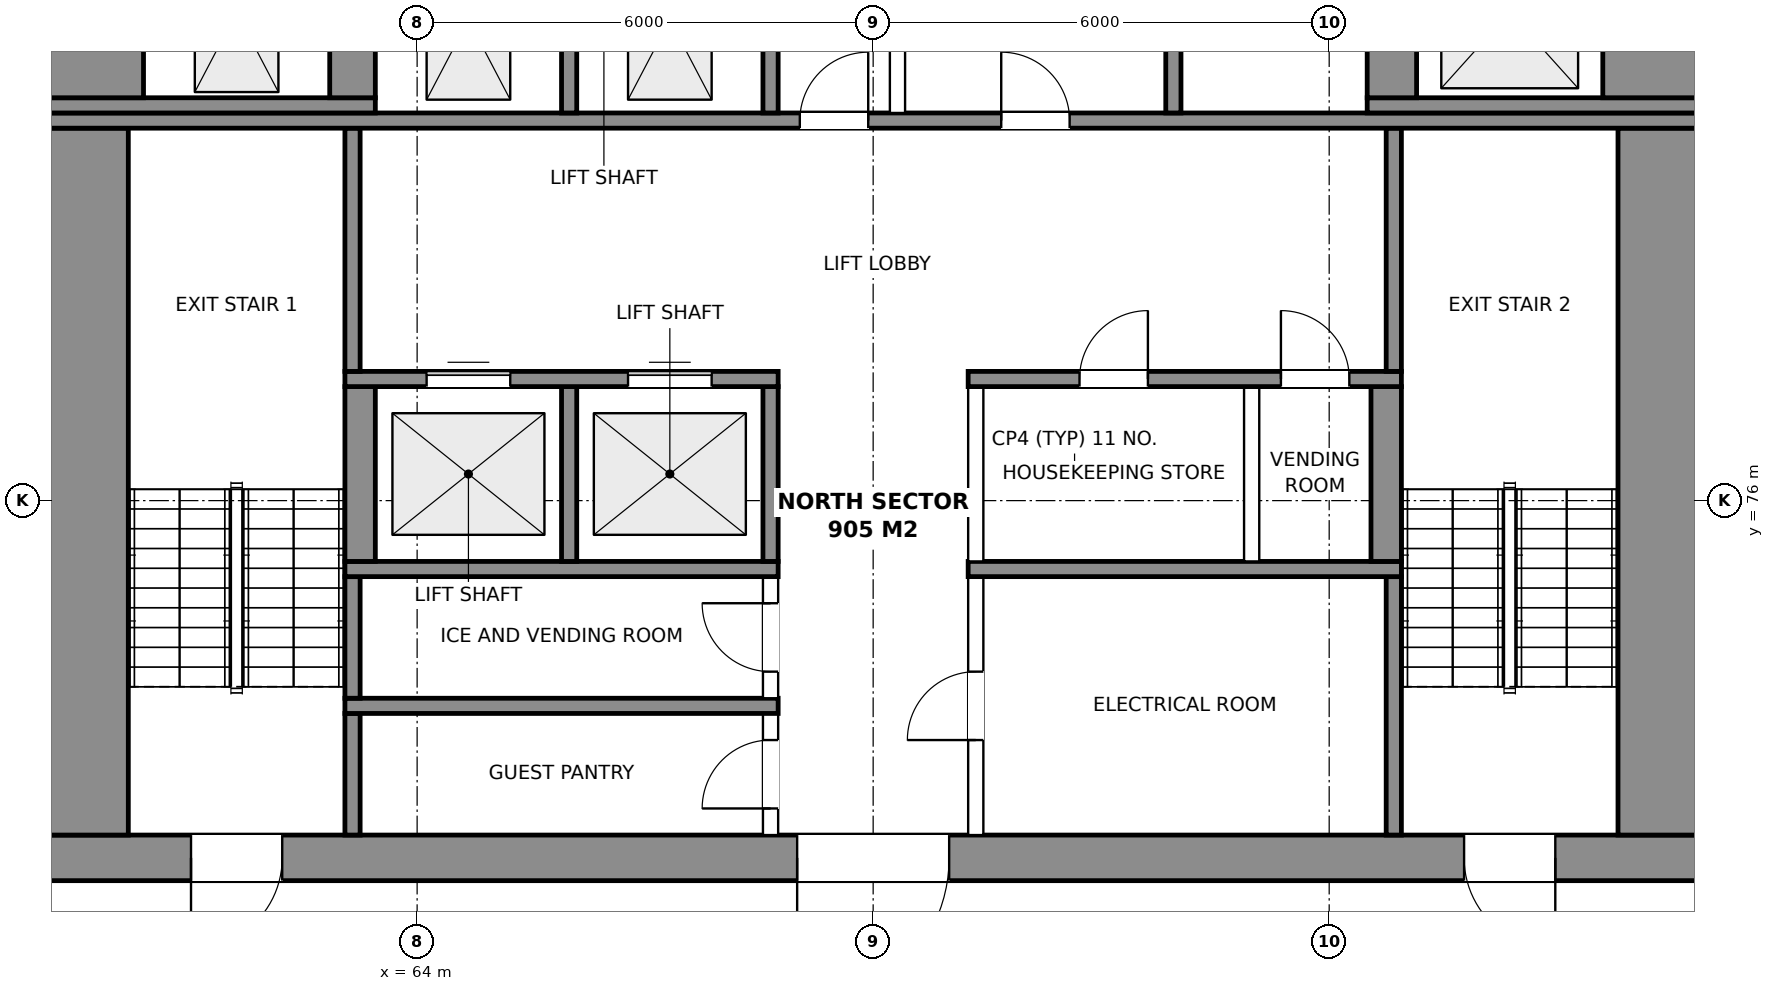
"""IFC4 building model, lengths in metres.
Left out: names, types, materials, properties, quantities, classifications, styles, units other than length and angle.
Written with IfcOpenShell. Run it as: python <this file> out.ifc"""

import sys

from ifc_helpers import new_model, si_unit, direction, frame, frame_2d, origin, place, context, subcontext, project, spatial, rectangle, extrude, element, fill, save


model = new_model("IFC4")
c1 = context("Model", 3, precision=1e-05, world=origin(), true_north=direction((0.0, 1.0)))
c2 = subcontext(c1, "Body", "Model", "MODEL_VIEW")
j1 = project(units=[si_unit("LENGTHUNIT", "METRE"), si_unit("PLANEANGLEUNIT", "RADIAN")], contexts=[c1])
p1 = place(None, origin())
s1 = spatial("IfcSite", under=j1, at=p1, CompositionType="ELEMENT")
p2 = place(p1, origin())
s2 = spatial("IfcBuilding", under=s1, at=p2, CompositionType="ELEMENT")
p3 = place(p2, frame((0.0, 0.0, 317.8)))
s3 = spatial("IfcBuildingStorey", under=s2, at=p3, CompositionType="ELEMENT", Elevation=317.8)
p4 = place(p3, frame((59.0, 71.3, 0.0), z_axis=(0.0, 0.0, 1.0), x_axis=(1.0, 0.0, 0.0)))
e1 = element("IfcWall", 1, at=p4, inside=s3, PredefinedType="SHEAR", context=c2, shape_type="SweptSolid", body=[
    extrude(rectangle(XDim=22.0, YDim=0.6, at=frame_2d((11.0, 0.0))), origin(), (0.0, 0.0, 1.0), 3.9),
])
p5 = place(p4, frame((2.025, 0.0, 0.0)))
e2 = element("IfcOpeningElement", 2, at=p5, cuts=e1, PredefinedType="OPENING", context=c2, shape_type="SweptSolid", body=[
    extrude(rectangle(XDim=1.2, YDim=2.1, at=frame_2d((0.6, 1.05))), frame((0.0, 0.31, 0.0), z_axis=(0.0, -1.0, 0.0), x_axis=(1.0, 0.0, 0.0)), (0.0, 0.0, 1.0), 0.62),
])
p6 = place(p4, frame((18.775, 0.0, 0.0)))
e3 = element("IfcOpeningElement", 3, at=p6, cuts=e1, PredefinedType="OPENING", context=c2, shape_type="SweptSolid", body=[
    extrude(rectangle(XDim=1.2, YDim=2.1, at=frame_2d((0.6, 1.05))), frame((0.0, 0.31, 0.0), z_axis=(0.0, -1.0, 0.0), x_axis=(1.0, 0.0, 0.0)), (0.0, 0.0, 1.0), 0.62),
])
p7 = place(p4, frame((10.0, 0.0, 0.0)))
e4 = element("IfcOpeningElement", 4, at=p7, cuts=e1, PredefinedType="OPENING", context=c2, shape_type="SweptSolid", body=[
    extrude(rectangle(XDim=2.0, YDim=2.1, at=frame_2d((1.0, 1.05))), frame((0.0, 0.31, 0.0), z_axis=(0.0, -1.0, 0.0), x_axis=(1.0, 0.0, 0.0)), (0.0, 0.0, 1.0), 0.62),
])
p8 = place(p3, frame((59.6, 71.6, 0.0), z_axis=(0.0, 0.0, 1.0), x_axis=(0.0, 1.0, 0.0)))
e5 = element("IfcWall", 5, at=p8, inside=s3, PredefinedType="SHEAR", context=c2, shape_type="SweptSolid", body=[
    extrude(rectangle(XDim=9.3, YDim=1.2, at=frame_2d((4.65, 0.0))), origin(), (0.0, 0.0, 1.0), 3.9),
])
p9 = place(p3, frame((63.15, 71.6, 0.0), z_axis=(0.0, 0.0, 1.0), x_axis=(0.0, 1.0, 0.0)))
e6 = element("IfcWall", 6, at=p9, inside=s3, PredefinedType="SHEAR", context=c2, shape_type="SweptSolid", body=[
    extrude(rectangle(XDim=1.6, YDim=0.2, at=frame_2d((0.8, 0.0))), origin(), (0.0, 0.0, 1.0), 3.9),
])
p10 = place(p3, frame((68.65, 71.6, 0.0), z_axis=(0.0, 0.0, 1.0), x_axis=(0.0, 1.0, 0.0)))
e7 = element("IfcWall", 7, at=p10, inside=s3, PredefinedType="PARTITIONING", context=c2, shape_type="SweptSolid", body=[
    extrude(rectangle(XDim=1.6, YDim=0.2, at=frame_2d((0.8, 0.0))), origin(), (0.0, 0.0, 1.0), 3.5),
])
p11 = place(p10, frame((0.35, 0.0, 0.0)))
e8 = element("IfcOpeningElement", 8, at=p11, cuts=e7, PredefinedType="OPENING", context=c2, shape_type="SweptSolid", body=[
    extrude(rectangle(XDim=0.9, YDim=2.1, at=frame_2d((0.45, 1.05))), frame((0.0, 0.11, 0.0), z_axis=(0.0, -1.0, 0.0), x_axis=(1.0, 0.0, 0.0)), (0.0, 0.0, 1.0), 0.22),
])
p12 = place(p3, frame((71.35, 71.6, 0.0), z_axis=(0.0, 0.0, 1.0), x_axis=(0.0, 1.0, 0.0)))
e9 = element("IfcWall", 9, at=p12, inside=s3, PredefinedType="PARTITIONING", context=c2, shape_type="SweptSolid", body=[
    extrude(rectangle(XDim=3.4, YDim=0.2, at=frame_2d((1.7, 0.0))), origin(), (0.0, 0.0, 1.0), 3.5),
])
p13 = place(p12, frame((1.25, 0.0, 0.0)))
e10 = element("IfcOpeningElement", 10, at=p13, cuts=e9, PredefinedType="OPENING", context=c2, shape_type="SweptSolid", body=[
    extrude(rectangle(XDim=0.9, YDim=2.1, at=frame_2d((0.45, 1.05))), frame((0.0, 0.11, 0.0), z_axis=(0.0, -1.0, 0.0), x_axis=(1.0, 0.0, 0.0)), (0.0, 0.0, 1.0), 0.22),
])
p14 = place(p3, frame((76.85, 71.6, 0.0), z_axis=(0.0, 0.0, 1.0), x_axis=(0.0, 1.0, 0.0)))
e11 = element("IfcWall", 11, at=p14, inside=s3, PredefinedType="SHEAR", context=c2, shape_type="SweptSolid", body=[
    extrude(rectangle(XDim=3.4, YDim=0.2, at=frame_2d((1.7, 0.0))), origin(), (0.0, 0.0, 1.0), 3.9),
])
p15 = place(p3, frame((80.4, 71.6, 0.0), z_axis=(0.0, 0.0, 1.0), x_axis=(0.0, 1.0, 0.0)))
e12 = element("IfcWall", 12, at=p15, inside=s3, PredefinedType="SHEAR", context=c2, shape_type="SweptSolid", body=[
    extrude(rectangle(XDim=9.3, YDim=1.2, at=frame_2d((4.65, 0.0))), origin(), (0.0, 0.0, 1.0), 3.9),
])
p16 = place(p3, frame((63.05, 73.3, 0.0), z_axis=(0.0, 0.0, 1.0), x_axis=(1.0, 0.0, 0.0)))
e13 = element("IfcWall", 13, at=p16, inside=s3, PredefinedType="SHEAR", context=c2, shape_type="SweptSolid", body=[
    extrude(rectangle(XDim=5.7, YDim=0.2, at=frame_2d((2.85, 0.0))), origin(), (0.0, 0.0, 1.0), 3.9),
])
p17 = place(p3, frame((63.15, 73.4, 0.0), z_axis=(0.0, 0.0, 1.0), x_axis=(0.0, 1.0, 0.0)))
e14 = element("IfcWall", 14, at=p17, inside=s3, PredefinedType="SHEAR", context=c2, shape_type="SweptSolid", body=[
    extrude(rectangle(XDim=1.6, YDim=0.2, at=frame_2d((0.8, 0.0))), origin(), (0.0, 0.0, 1.0), 3.9),
])
p18 = place(p3, frame((68.65, 73.4, 0.0), z_axis=(0.0, 0.0, 1.0), x_axis=(0.0, 1.0, 0.0)))
e15 = element("IfcWall", 15, at=p18, inside=s3, PredefinedType="PARTITIONING", context=c2, shape_type="SweptSolid", body=[
    extrude(rectangle(XDim=1.6, YDim=0.2, at=frame_2d((0.8, 0.0))), origin(), (0.0, 0.0, 1.0), 3.5),
])
p19 = place(p18, frame((0.35, 0.0, 0.0)))
e16 = element("IfcOpeningElement", 16, at=p19, cuts=e15, PredefinedType="OPENING", context=c2, shape_type="SweptSolid", body=[
    extrude(rectangle(XDim=0.9, YDim=2.1, at=frame_2d((0.45, 1.05))), frame((0.0, 0.11, 0.0), z_axis=(0.0, -1.0, 0.0), x_axis=(1.0, 0.0, 0.0)), (0.0, 0.0, 1.0), 0.22),
])
for number, where, z_axis, x_axis in (
    (17, (63.05, 75.1, 0.0), (0.0, 0.0, 1.0), (1.0, 0.0, 0.0)),
    (18, (71.25, 75.1, 0.0), (0.0, 0.0, 1.0), (1.0, 0.0, 0.0)),
):
    element("IfcWall", number, at=place(p3, frame(where, z_axis=z_axis, x_axis=x_axis)), inside=s3, PredefinedType="SHEAR", context=c2, shape_type="SweptSolid", body=[
        extrude(rectangle(XDim=5.7, YDim=0.2, at=frame_2d((2.85, 0.0))), origin(), (0.0, 0.0, 1.0), 3.9),
    ])
p20 = place(p3, frame((63.25, 75.2, 0.0), z_axis=(0.0, 0.0, 1.0), x_axis=(0.0, 1.0, 0.0)))
e19 = element("IfcWall", 19, at=p20, inside=s3, PredefinedType="SHEAR", context=c2, shape_type="SweptSolid", body=[
    extrude(rectangle(XDim=2.3, YDim=0.4, at=frame_2d((1.15, 0.0))), origin(), (0.0, 0.0, 1.0), 3.9),
])
for number, where, z_axis, x_axis in (
    (20, (66.0, 75.2, 0.0), (0.0, 0.0, 1.0), (0.0, 1.0, 0.0)),
    (21, (68.65, 75.2, 0.0), (0.0, 0.0, 1.0), (0.0, 1.0, 0.0)),
):
    element("IfcWall", number, at=place(p3, frame(where, z_axis=z_axis, x_axis=x_axis)), inside=s3, PredefinedType="SHEAR", context=c2, shape_type="SweptSolid", body=[
        extrude(rectangle(XDim=2.3, YDim=0.2, at=frame_2d((1.15, 0.0))), origin(), (0.0, 0.0, 1.0), 3.9),
    ])
for number, where, z_axis, x_axis in (
    (22, (71.35, 75.2, 0.0), (0.0, 0.0, 1.0), (0.0, 1.0, 0.0)),
    (23, (74.98, 75.2, 0.0), (0.0, 0.0, 1.0), (0.0, 1.0, 0.0)),
):
    element("IfcWall", number, at=place(p3, frame(where, z_axis=z_axis, x_axis=x_axis)), inside=s3, PredefinedType="PARTITIONING", context=c2, shape_type="SweptSolid", body=[
        extrude(rectangle(XDim=2.3, YDim=0.2, at=frame_2d((1.15, 0.0))), origin(), (0.0, 0.0, 1.0), 3.5),
    ])
p21 = place(p3, frame((76.75, 75.2, 0.0), z_axis=(0.0, 0.0, 1.0), x_axis=(0.0, 1.0, 0.0)))
e24 = element("IfcWall", 24, at=p21, inside=s3, PredefinedType="SHEAR", context=c2, shape_type="SweptSolid", body=[
    extrude(rectangle(XDim=2.3, YDim=0.4, at=frame_2d((1.15, 0.0))), origin(), (0.0, 0.0, 1.0), 3.9),
])
p22 = place(p3, frame((63.05, 77.6, 0.0), z_axis=(0.0, 0.0, 1.0), x_axis=(1.0, 0.0, 0.0)))
e25 = element("IfcWall", 25, at=p22, inside=s3, PredefinedType="SHEAR", context=c2, shape_type="SweptSolid", body=[
    extrude(rectangle(XDim=5.7, YDim=0.2, at=frame_2d((2.85, 0.0))), origin(), (0.0, 0.0, 1.0), 3.9),
])
p23 = place(p22, frame((1.075, 0.0, 0.0)))
e26 = element("IfcOpeningElement", 26, at=p23, cuts=e25, PredefinedType="OPENING", context=c2, shape_type="SweptSolid", body=[
    extrude(rectangle(XDim=1.1, YDim=2.1, at=frame_2d((0.55, 1.05))), frame((0.0, 0.11, 0.0), z_axis=(0.0, -1.0, 0.0), x_axis=(1.0, 0.0, 0.0)), (0.0, 0.0, 1.0), 0.22),
])
p24 = place(p22, frame((3.725, 0.0, 0.0)))
e27 = element("IfcOpeningElement", 27, at=p24, cuts=e25, PredefinedType="OPENING", context=c2, shape_type="SweptSolid", body=[
    extrude(rectangle(XDim=1.1, YDim=2.1, at=frame_2d((0.55, 1.05))), frame((0.0, 0.11, 0.0), z_axis=(0.0, -1.0, 0.0), x_axis=(1.0, 0.0, 0.0)), (0.0, 0.0, 1.0), 0.22),
])
p25 = place(p3, frame((71.25, 77.6, 0.0), z_axis=(0.0, 0.0, 1.0), x_axis=(1.0, 0.0, 0.0)))
e28 = element("IfcWall", 28, at=p25, inside=s3, PredefinedType="SHEAR", context=c2, shape_type="SweptSolid", body=[
    extrude(rectangle(XDim=5.7, YDim=0.2, at=frame_2d((2.85, 0.0))), origin(), (0.0, 0.0, 1.0), 3.9),
])
p26 = place(p25, frame((1.465, 0.0, 0.0)))
e29 = element("IfcOpeningElement", 29, at=p26, cuts=e28, PredefinedType="OPENING", context=c2, shape_type="SweptSolid", body=[
    extrude(rectangle(XDim=0.9, YDim=2.1, at=frame_2d((0.45, 1.05))), frame((0.0, 0.11, 0.0), z_axis=(0.0, -1.0, 0.0), x_axis=(1.0, 0.0, 0.0)), (0.0, 0.0, 1.0), 0.22),
])
p27 = place(p25, frame((4.115, 0.0, 0.0)))
e30 = element("IfcOpeningElement", 30, at=p27, cuts=e28, PredefinedType="OPENING", context=c2, shape_type="SweptSolid", body=[
    extrude(rectangle(XDim=0.9, YDim=2.1, at=frame_2d((0.45, 1.05))), frame((0.0, 0.11, 0.0), z_axis=(0.0, -1.0, 0.0), x_axis=(1.0, 0.0, 0.0)), (0.0, 0.0, 1.0), 0.22),
])
for number, where, z_axis, x_axis in (
    (31, (63.15, 77.7, 0.0), (0.0, 0.0, 1.0), (0.0, 1.0, 0.0)),
    (32, (76.85, 77.7, 0.0), (0.0, 0.0, 1.0), (0.0, 1.0, 0.0)),
):
    element("IfcWall", number, at=place(p3, frame(where, z_axis=z_axis, x_axis=x_axis)), inside=s3, PredefinedType="SHEAR", context=c2, shape_type="SweptSolid", body=[
        extrude(rectangle(XDim=3.2, YDim=0.2, at=frame_2d((1.6, 0.0))), origin(), (0.0, 0.0, 1.0), 3.9),
    ])
p28 = place(p3, frame((59.0, 81.0, 0.0), z_axis=(0.0, 0.0, 1.0), x_axis=(1.0, 0.0, 0.0)))
e33 = element("IfcWall", 33, at=p28, inside=s3, PredefinedType="SHEAR", context=c2, shape_type="SweptSolid", body=[
    extrude(rectangle(XDim=22.0, YDim=0.2, at=frame_2d((11.0, 0.0))), origin(), (0.0, 0.0, 1.0), 3.9),
])
p29 = place(p28, frame((10.035, 0.0, 0.0)))
e34 = element("IfcOpeningElement", 34, at=p29, cuts=e33, PredefinedType="OPENING", context=c2, shape_type="SweptSolid", body=[
    extrude(rectangle(XDim=0.9, YDim=2.1, at=frame_2d((0.45, 1.05))), frame((0.0, 0.11, 0.0), z_axis=(0.0, -1.0, 0.0), x_axis=(1.0, 0.0, 0.0)), (0.0, 0.0, 1.0), 0.22),
])
p30 = place(p28, frame((12.685, 0.0, 0.0)))
e35 = element("IfcOpeningElement", 35, at=p30, cuts=e33, PredefinedType="OPENING", context=c2, shape_type="SweptSolid", body=[
    extrude(rectangle(XDim=0.9, YDim=2.1, at=frame_2d((0.45, 1.05))), frame((0.0, 0.11, 0.0), z_axis=(0.0, -1.0, 0.0), x_axis=(1.0, 0.0, 0.0)), (0.0, 0.0, 1.0), 0.22),
])
p31 = place(p3, frame((59.0, 81.2, 0.0), z_axis=(0.0, 0.0, 1.0), x_axis=(1.0, 0.0, 0.0)))
e36 = element("IfcWall", 36, at=p31, inside=s3, PredefinedType="SHEAR", context=c2, shape_type="SweptSolid", body=[
    extrude(rectangle(XDim=4.45, YDim=0.2, at=frame_2d((2.225, 0.0))), origin(), (0.0, 0.0, 1.0), 3.9),
])
for number, where, z_axis, x_axis in (
    (37, (66.0, 81.1, 0.0), (0.0, 0.0, 1.0), (0.0, 1.0, 0.0)),
    (38, (68.65, 81.1, 0.0), (0.0, 0.0, 1.0), (0.0, 1.0, 0.0)),
):
    element("IfcWall", number, at=place(p3, frame(where, z_axis=z_axis, x_axis=x_axis)), inside=s3, PredefinedType="SHEAR", context=c2, shape_type="SweptSolid", body=[
        extrude(rectangle(XDim=2.45, YDim=0.2, at=frame_2d((1.225, 0.0))), origin(), (0.0, 0.0, 1.0), 3.9),
    ])
p32 = place(p3, frame((70.32, 81.1, 0.0), z_axis=(0.0, 0.0, 1.0), x_axis=(0.0, 1.0, 0.0)))
e39 = element("IfcWall", 39, at=p32, inside=s3, PredefinedType="PARTITIONING", context=c2, shape_type="SweptSolid", body=[
    extrude(rectangle(XDim=2.45, YDim=0.2, at=frame_2d((1.225, 0.0))), origin(), (0.0, 0.0, 1.0), 3.5),
])
p33 = place(p3, frame((73.95, 81.1, 0.0), z_axis=(0.0, 0.0, 1.0), x_axis=(0.0, 1.0, 0.0)))
e40 = element("IfcWall", 40, at=p33, inside=s3, PredefinedType="SHEAR", context=c2, shape_type="SweptSolid", body=[
    extrude(rectangle(XDim=2.45, YDim=0.2, at=frame_2d((1.225, 0.0))), origin(), (0.0, 0.0, 1.0), 3.9),
])
p34 = place(p3, frame((76.5, 81.2, 0.0), z_axis=(0.0, 0.0, 1.0), x_axis=(1.0, 0.0, 0.0)))
e41 = element("IfcWall", 41, at=p34, inside=s3, PredefinedType="SHEAR", context=c2, shape_type="SweptSolid", body=[
    extrude(rectangle(XDim=4.5, YDim=0.2, at=frame_2d((2.25, 0.0))), origin(), (0.0, 0.0, 1.0), 3.9),
])
p35 = place(p3, frame((59.7, 81.3, 0.0), z_axis=(0.0, 0.0, 1.0), x_axis=(0.0, 1.0, 0.0)))
e42 = element("IfcWall", 42, at=p35, inside=s3, PredefinedType="SHEAR", context=c2, shape_type="SweptSolid", body=[
    extrude(rectangle(XDim=2.25, YDim=1.4, at=frame_2d((1.125, 0.0))), origin(), (0.0, 0.0, 1.0), 3.9),
])
p36 = place(p3, frame((63.15, 81.3, 0.0), z_axis=(0.0, 0.0, 1.0), x_axis=(0.0, 1.0, 0.0)))
e43 = element("IfcWall", 43, at=p36, inside=s3, PredefinedType="SHEAR", context=c2, shape_type="SweptSolid", body=[
    extrude(rectangle(XDim=2.25, YDim=0.6, at=frame_2d((1.125, 0.0))), origin(), (0.0, 0.0, 1.0), 3.9),
])
p37 = place(p3, frame((76.825, 81.3, 0.0), z_axis=(0.0, 0.0, 1.0), x_axis=(0.0, 1.0, 0.0)))
e44 = element("IfcWall", 44, at=p37, inside=s3, PredefinedType="SHEAR", context=c2, shape_type="SweptSolid", body=[
    extrude(rectangle(XDim=2.25, YDim=0.65, at=frame_2d((1.125, 0.0))), origin(), (0.0, 0.0, 1.0), 3.9),
])
p38 = place(p3, frame((80.3, 81.3, 0.0), z_axis=(0.0, 0.0, 1.0), x_axis=(0.0, 1.0, 0.0)))
e45 = element("IfcWall", 45, at=p38, inside=s3, PredefinedType="SHEAR", context=c2, shape_type="SweptSolid", body=[
    extrude(rectangle(XDim=2.25, YDim=1.4, at=frame_2d((1.125, 0.0))), origin(), (0.0, 0.0, 1.0), 3.9),
])
p39 = place(p5, frame((1.2, 0.0, 0.0), z_axis=(0.0, 0.0, 1.0), x_axis=(-1.0, 0.0, 0.0)))
e46 = element("IfcDoor", 46, at=p39, inside=s3, OperationType="SINGLE_SWING_RIGHT", PredefinedType="DOOR", context=c2, shape_type="SweptSolid", body=[
    extrude(rectangle(XDim=1.2, YDim=2.1, at=frame_2d((0.6, 1.05))), frame((0.0, 0.025, 0.0), z_axis=(0.0, -1.0, 0.0), x_axis=(1.0, 0.0, 0.0)), (0.0, 0.0, 1.0), 0.05),
])
fill(e2, e46)
p40 = place(p6, frame((1.2, 0.0, 0.0), z_axis=(0.0, 0.0, 1.0), x_axis=(-1.0, 0.0, 0.0)))
e47 = element("IfcDoor", 47, at=p40, inside=s3, OperationType="SINGLE_SWING_LEFT", PredefinedType="DOOR", context=c2, shape_type="SweptSolid", body=[
    extrude(rectangle(XDim=1.2, YDim=2.1, at=frame_2d((0.6, 1.05))), frame((0.0, 0.025, 0.0), z_axis=(0.0, -1.0, 0.0), x_axis=(1.0, 0.0, 0.0)), (0.0, 0.0, 1.0), 0.05),
])
fill(e3, e47)
p41 = place(p7, frame((2.0, 0.0, 0.0), z_axis=(0.0, 0.0, 1.0), x_axis=(-1.0, 0.0, 0.0)))
e48 = element("IfcDoor", 48, at=p41, inside=s3, OperationType="DOUBLE_DOOR_SINGLE_SWING", PredefinedType="DOOR", context=c2, shape_type="SweptSolid", body=[
    extrude(rectangle(XDim=2.0, YDim=2.1, at=frame_2d((1.0, 1.05))), frame((0.0, 0.025, 0.0), z_axis=(0.0, -1.0, 0.0), x_axis=(1.0, 0.0, 0.0)), (0.0, 0.0, 1.0), 0.05),
])
fill(e4, e48)
p42 = place(p11, origin())
e49 = element("IfcDoor", 49, at=p42, inside=s3, OperationType="SINGLE_SWING_LEFT", PredefinedType="DOOR", context=c2, shape_type="SweptSolid", body=[
    extrude(rectangle(XDim=0.9, YDim=2.1, at=frame_2d((0.45, 1.05))), frame((0.0, 0.025, 0.0), z_axis=(0.0, -1.0, 0.0), x_axis=(1.0, 0.0, 0.0)), (0.0, 0.0, 1.0), 0.05),
])
fill(e8, e49)
p43 = place(p19, origin())
e50 = element("IfcDoor", 50, at=p43, inside=s3, OperationType="SINGLE_SWING_RIGHT", PredefinedType="DOOR", context=c2, shape_type="SweptSolid", body=[
    extrude(rectangle(XDim=0.9, YDim=2.1, at=frame_2d((0.45, 1.05))), frame((0.0, 0.025, 0.0), z_axis=(0.0, -1.0, 0.0), x_axis=(1.0, 0.0, 0.0)), (0.0, 0.0, 1.0), 0.05),
])
fill(e16, e50)
p44 = place(p13, origin())
e51 = element("IfcDoor", 51, at=p44, inside=s3, OperationType="SINGLE_SWING_LEFT", PredefinedType="DOOR", context=c2, shape_type="SweptSolid", body=[
    extrude(rectangle(XDim=0.9, YDim=2.1, at=frame_2d((0.45, 1.05))), frame((0.0, 0.025, 0.0), z_axis=(0.0, -1.0, 0.0), x_axis=(1.0, 0.0, 0.0)), (0.0, 0.0, 1.0), 0.05),
])
fill(e10, e51)
p45 = place(p23, origin())
e52 = element("IfcDoor", 52, at=p45, inside=s3, OperationType="DOUBLE_DOOR_SLIDING", PredefinedType="DOOR", context=c2, shape_type="SweptSolid", body=[
    extrude(rectangle(XDim=1.1, YDim=2.1, at=frame_2d((0.55, 1.05))), frame((0.0, 0.025, 0.0), z_axis=(0.0, -1.0, 0.0), x_axis=(1.0, 0.0, 0.0)), (0.0, 0.0, 1.0), 0.05),
])
fill(e26, e52)
p46 = place(p24, origin())
e53 = element("IfcDoor", 53, at=p46, inside=s3, OperationType="DOUBLE_DOOR_SLIDING", PredefinedType="DOOR", context=c2, shape_type="SweptSolid", body=[
    extrude(rectangle(XDim=1.1, YDim=2.1, at=frame_2d((0.55, 1.05))), frame((0.0, 0.025, 0.0), z_axis=(0.0, -1.0, 0.0), x_axis=(1.0, 0.0, 0.0)), (0.0, 0.0, 1.0), 0.05),
])
fill(e27, e53)
p47 = place(p26, origin())
e54 = element("IfcDoor", 54, at=p47, inside=s3, OperationType="SINGLE_SWING_RIGHT", PredefinedType="DOOR", context=c2, shape_type="SweptSolid", body=[
    extrude(rectangle(XDim=0.9, YDim=2.1, at=frame_2d((0.45, 1.05))), frame((0.0, 0.025, 0.0), z_axis=(0.0, -1.0, 0.0), x_axis=(1.0, 0.0, 0.0)), (0.0, 0.0, 1.0), 0.05),
])
fill(e29, e54)
p48 = place(p27, origin())
e55 = element("IfcDoor", 55, at=p48, inside=s3, OperationType="SINGLE_SWING_LEFT", PredefinedType="DOOR", context=c2, shape_type="SweptSolid", body=[
    extrude(rectangle(XDim=0.9, YDim=2.1, at=frame_2d((0.45, 1.05))), frame((0.0, 0.025, 0.0), z_axis=(0.0, -1.0, 0.0), x_axis=(1.0, 0.0, 0.0)), (0.0, 0.0, 1.0), 0.05),
])
fill(e30, e55)
p49 = place(p29, origin())
e56 = element("IfcDoor", 56, at=p49, inside=s3, OperationType="SINGLE_SWING_RIGHT", PredefinedType="DOOR", context=c2, shape_type="SweptSolid", body=[
    extrude(rectangle(XDim=0.9, YDim=2.1, at=frame_2d((0.45, 1.05))), frame((0.0, 0.025, 0.0), z_axis=(0.0, -1.0, 0.0), x_axis=(1.0, 0.0, 0.0)), (0.0, 0.0, 1.0), 0.05),
])
fill(e34, e56)
p50 = place(p30, origin())
e57 = element("IfcDoor", 57, at=p50, inside=s3, OperationType="SINGLE_SWING_LEFT", PredefinedType="DOOR", context=c2, shape_type="SweptSolid", body=[
    extrude(rectangle(XDim=0.9, YDim=2.1, at=frame_2d((0.45, 1.05))), frame((0.0, 0.025, 0.0), z_axis=(0.0, -1.0, 0.0), x_axis=(1.0, 0.0, 0.0)), (0.0, 0.0, 1.0), 0.05),
])
fill(e35, e57)
save(model, sys.argv[1])
